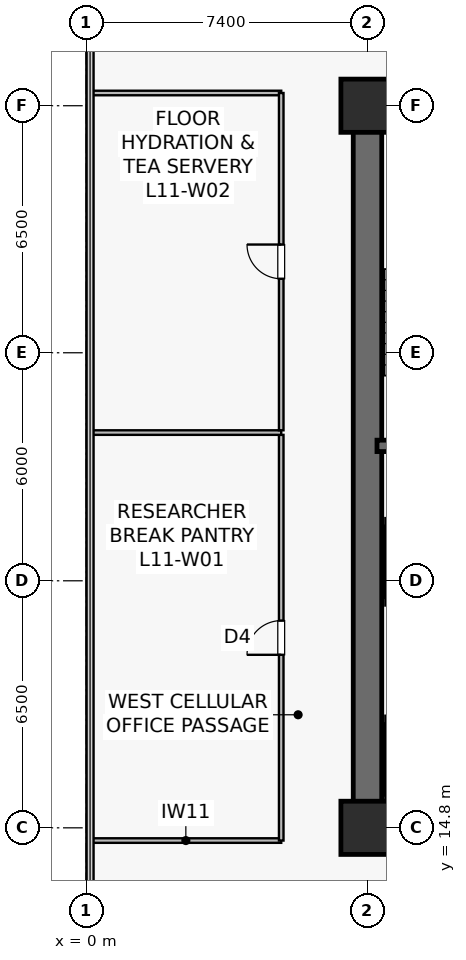
"""IFC4 building model, lengths in metres.
Left out: names, types, materials, properties, quantities, classifications, styles, units other than length and angle.
Written with IfcOpenShell. Run it as: python <this file> out.ifc"""

import sys

from ifc_helpers import new_model, si_unit, direction, frame, frame_2d, origin, origin_2d, place, context, subcontext, project, spatial, rectangle, extrude, source, transform, mapped, element, fill, save


model = new_model("IFC4")
c1 = context("Model", 3, precision=1e-05, world=origin(), true_north=direction((0.0, 1.0)))
c2 = subcontext(c1, "Body", "Model", "MODEL_VIEW")
j1 = project(units=[si_unit("LENGTHUNIT", "METRE"), si_unit("PLANEANGLEUNIT", "RADIAN")], contexts=[c1])
p1 = place(None, origin())
s1 = spatial("IfcSite", under=j1, at=p1, CompositionType="ELEMENT")
p2 = place(p1, origin())
s2 = spatial("IfcBuilding", under=s1, at=p2, CompositionType="ELEMENT")
p3 = place(p2, frame((0.0, 0.0, 45.7)))
s3 = spatial("IfcBuildingStorey", under=s2, at=p3, CompositionType="ELEMENT", Elevation=45.7)
p4 = place(p3, frame((7.025, 14.8, 0.0), z_axis=(0.0, 0.0, 1.0), x_axis=(1.0, 0.0, 0.0)))
e1 = element("IfcWall", 1, at=p4, inside=s3, PredefinedType="SHEAR", context=c2, shape_type="SweptSolid", body=[
    extrude(rectangle(XDim=15.55, YDim=0.75, at=frame_2d((7.775, 0.0))), origin(), (0.0, 0.0, 1.0), 3.78),
])
p5 = place(p3, frame((7.025, 33.8, 0.0), z_axis=(0.0, 0.0, 1.0), x_axis=(1.0, 0.0, 0.0)))
e2 = element("IfcWall", 2, at=p5, inside=s3, PredefinedType="SHEAR", context=c2, shape_type="SweptSolid", body=[
    extrude(rectangle(XDim=15.55, YDim=0.75, at=frame_2d((7.775, 0.0))), origin(), (0.0, 0.0, 1.0), 3.78),
])
p6 = place(p5, frame((5.725, 0.0, 0.0)))
e3 = element("IfcOpeningElement", 3, at=p6, cuts=e2, PredefinedType="OPENING", context=c2, shape_type="SweptSolid", body=[
    extrude(rectangle(XDim=0.95, YDim=2.15, at=frame_2d((0.475, 1.075))), frame((0.0, 0.385, 0.0), z_axis=(0.0, -1.0, 0.0), x_axis=(1.0, 0.0, 0.0)), (0.0, 0.0, 1.0), 0.77),
])
p7 = place(p5, frame((9.09, 0.0, 0.0)))
e4 = element("IfcOpeningElement", 4, at=p7, cuts=e2, PredefinedType="OPENING", context=c2, shape_type="SweptSolid", body=[
    extrude(rectangle(XDim=0.95, YDim=2.15, at=frame_2d((0.475, 1.075))), frame((0.0, 0.385, 0.0), z_axis=(0.0, -1.0, 0.0), x_axis=(1.0, 0.0, 0.0)), (0.0, 0.0, 1.0), 0.77),
])
p8 = place(p5, frame((12.49, 0.0, 0.0)))
e5 = element("IfcOpeningElement", 5, at=p8, cuts=e2, PredefinedType="OPENING", context=c2, shape_type="SweptSolid", body=[
    extrude(rectangle(XDim=0.95, YDim=2.15, at=frame_2d((0.475, 1.075))), frame((0.0, 0.385, 0.0), z_axis=(0.0, -1.0, 0.0), x_axis=(1.0, 0.0, 0.0)), (0.0, 0.0, 1.0), 0.77),
])
p9 = place(p3, frame((7.4, 15.175, 0.0), z_axis=(0.0, 0.0, 1.0), x_axis=(0.0, 1.0, 0.0)))
e6 = element("IfcWall", 6, at=p9, inside=s3, PredefinedType="SHEAR", context=c2, shape_type="SweptSolid", body=[
    extrude(rectangle(XDim=18.25, YDim=0.75, at=frame_2d((9.125, 0.0))), origin(), (0.0, 0.0, 1.0), 3.78),
])
p10 = place(p3, frame((7.65, 24.85, 0.0), z_axis=(0.0, 0.0, 1.0), x_axis=(1.0, 0.0, 0.0)))
e7 = element("IfcWall", 7, at=p10, inside=s3, PredefinedType="SHEAR", context=c2, shape_type="SweptSolid", body=[
    extrude(rectangle(XDim=3.8, YDim=0.3, at=frame_2d((1.9, 0.0))), origin(), (0.0, 0.0, 1.0), 3.78),
])
p11 = place(p3, frame((7.73, 33.4, 0.0), z_axis=(0.0, 0.0, 1.0), x_axis=(1.0, 0.0, 0.0)))
e8 = element("IfcWall", 8, at=p11, inside=s3, PredefinedType="SOLIDWALL", context=c2, shape_type="SweptSolid", body=[
    extrude(rectangle(XDim=3.72, YDim=0.12, at=frame_2d((1.86, 0.0))), origin(), (0.0, 0.0, 1.0), 3.78),
])
m1 = source(origin(), c2, "Body", "SweptSolid", [
    extrude(rectangle(XDim=1.4, YDim=1.4, at=origin_2d()), origin(), (0.0, 0.0, 1.0), 4.1),
])
for number, where, z_axis, x_axis in (
    (9, (7.4, 14.8, 0.0), (0.0, 0.0, 1.0), (1.0, 0.0, 0.0)),
    (10, (7.4, 33.8, 0.0), (0.0, 0.0, 1.0), (1.0, 0.0, 0.0)),
):
    element("IfcColumn", number, at=place(p3, frame(where, z_axis=z_axis, x_axis=x_axis)), inside=s3, PredefinedType="COLUMN", context=c2, shape_type="MappedRepresentation", body=[
        mapped(m1, transform((0.0, 0.0, 0.0), scale=1.0)),
    ])
p12 = place(p3, frame((7.87, 17.65, 0.0), z_axis=(0.0, 0.0, 1.0), x_axis=(1.0, 0.0, 0.0)))
e11 = element("IfcWall", 11, at=p12, inside=s3, PredefinedType="SOLIDWALL", context=c2, shape_type="SweptSolid", body=[
    extrude(rectangle(XDim=2.26, YDim=0.2, at=frame_2d((1.13, 0.0))), origin(), (0.0, 0.0, 1.0), 3.78),
])
p13 = place(p12, frame((0.58, 0.0, 0.0)))
e12 = element("IfcOpeningElement", 12, at=p13, cuts=e11, PredefinedType="OPENING", context=c2, shape_type="SweptSolid", body=[
    extrude(rectangle(XDim=1.1, YDim=2.22, at=frame_2d((0.55, 1.11))), frame((0.0, 0.11, 0.0), z_axis=(0.0, -1.0, 0.0), x_axis=(1.0, 0.0, 0.0)), (0.0, 0.0, 1.0), 0.22),
])
p14 = place(p3, frame((7.87, 15.55, 0.0), z_axis=(0.0, 0.0, 1.0), x_axis=(1.0, 0.0, 0.0)))
e13 = element("IfcWall", 13, at=p14, inside=s3, PredefinedType="SOLIDWALL", context=c2, shape_type="SweptSolid", body=[
    extrude(rectangle(XDim=2.26, YDim=0.2, at=frame_2d((1.13, 0.0))), origin(), (0.0, 0.0, 1.0), 3.78),
])
p15 = place(p3, frame((7.95, 15.65, 0.0), z_axis=(0.0, 0.0, 1.0), x_axis=(0.0, 1.0, 0.0)))
e14 = element("IfcWall", 14, at=p15, inside=s3, PredefinedType="SOLIDWALL", context=c2, shape_type="SweptSolid", body=[
    extrude(rectangle(XDim=1.9, YDim=0.18, at=frame_2d((0.95, 0.0))), origin(), (0.0, 0.0, 1.0), 3.78),
])
for number, where, z_axis, x_axis in (
    (15, (7.87, 20.75, 0.0), (0.0, 0.0, 1.0), (1.0, 0.0, 0.0)),
    (16, (7.87, 22.85, 0.0), (0.0, 0.0, 1.0), (1.0, 0.0, 0.0)),
):
    element("IfcWall", number, at=place(p3, frame(where, z_axis=z_axis, x_axis=x_axis)), inside=s3, PredefinedType="SOLIDWALL", context=c2, shape_type="SweptSolid", body=[
        extrude(rectangle(XDim=2.26, YDim=0.2, at=frame_2d((1.13, 0.0))), origin(), (0.0, 0.0, 1.0), 3.78),
    ])
p16 = place(p3, frame((7.95, 20.85, 0.0), z_axis=(0.0, 0.0, 1.0), x_axis=(0.0, 1.0, 0.0)))
e17 = element("IfcWall", 17, at=p16, inside=s3, PredefinedType="SOLIDWALL", context=c2, shape_type="SweptSolid", body=[
    extrude(rectangle(XDim=1.9, YDim=0.18, at=frame_2d((0.95, 0.0))), origin(), (0.0, 0.0, 1.0), 3.78),
])
for number, where, z_axis, x_axis in (
    (18, (0.11, 14.465, 0.0), (0.0, 0.0, 1.0), (1.0, 0.0, 0.0)),
    (19, (0.11, 34.135, 0.0), (0.0, 0.0, 1.0), (1.0, 0.0, 0.0)),
):
    element("IfcWall", number, at=place(p3, frame(where, z_axis=z_axis, x_axis=x_axis)), inside=s3, PredefinedType="PARTITIONING", context=c2, shape_type="SweptSolid", body=[
        extrude(rectangle(XDim=5.02, YDim=0.12, at=frame_2d((2.51, 0.0))), origin(), (0.0, 0.0, 1.0), 3.78),
    ])
p17 = place(p3, frame((5.13, 14.465, 0.0), z_axis=(0.0, 0.0, 1.0), x_axis=(0.0, 1.0, 0.0)))
e20 = element("IfcWall", 20, at=p17, inside=s3, PredefinedType="PARTITIONING", context=c2, shape_type="SweptSolid", body=[
    extrude(rectangle(XDim=10.675, YDim=0.12, at=frame_2d((5.337, 0.0))), origin(), (0.0, 0.0, 1.0), 3.78),
])
p18 = place(p17, frame((4.887, 0.0, 0.0)))
e21 = element("IfcOpeningElement", 21, at=p18, cuts=e20, PredefinedType="OPENING", context=c2, shape_type="SweptSolid", body=[
    extrude(rectangle(XDim=0.9, YDim=2.1, at=frame_2d((0.45, 1.05))), frame((0.0, 0.07, 0.0), z_axis=(0.0, -1.0, 0.0), x_axis=(1.0, 0.0, 0.0)), (0.0, 0.0, 1.0), 0.14),
])
p19 = place(p3, frame((0.11, 25.2, 0.0), z_axis=(0.0, 0.0, 1.0), x_axis=(1.0, 0.0, 0.0)))
e22 = element("IfcWall", 22, at=p19, inside=s3, PredefinedType="PARTITIONING", context=c2, shape_type="SweptSolid", body=[
    extrude(rectangle(XDim=5.02, YDim=0.12, at=frame_2d((2.51, 0.0))), origin(), (0.0, 0.0, 1.0), 3.78),
])
p20 = place(p3, frame((5.13, 25.26, 0.0), z_axis=(0.0, 0.0, 1.0), x_axis=(0.0, 1.0, 0.0)))
e23 = element("IfcWall", 23, at=p20, inside=s3, PredefinedType="PARTITIONING", context=c2, shape_type="SweptSolid", body=[
    extrude(rectangle(XDim=8.875, YDim=0.12, at=frame_2d((4.438, 0.0))), origin(), (0.0, 0.0, 1.0), 3.78),
])
p21 = place(p20, frame((3.988, 0.0, 0.0)))
e24 = element("IfcOpeningElement", 24, at=p21, cuts=e23, PredefinedType="OPENING", context=c2, shape_type="SweptSolid", body=[
    extrude(rectangle(XDim=0.9, YDim=2.1, at=frame_2d((0.45, 1.05))), frame((0.0, 0.07, 0.0), z_axis=(0.0, -1.0, 0.0), x_axis=(1.0, 0.0, 0.0)), (0.0, 0.0, 1.0), 0.14),
])
m2 = source(origin(), c2, "Body", "SweptSolid", [
    extrude(rectangle(XDim=0.9, YDim=2.1, at=frame_2d((0.45, 1.05))), frame((0.0, 0.025, 0.0), z_axis=(0.0, -1.0, 0.0), x_axis=(1.0, 0.0, 0.0)), (0.0, 0.0, 1.0), 0.05),
])
p22 = place(p18, origin())
e25 = element("IfcDoor", 25, at=p22, inside=s3, OperationType="SINGLE_SWING_LEFT", PredefinedType="DOOR", context=c2, shape_type="MappedRepresentation", body=[
    mapped(m2, transform((0.0, 0.0, 0.0), scale=1.0)),
])
fill(e21, e25)
p23 = place(p21, origin())
e26 = element("IfcDoor", 26, at=p23, inside=s3, OperationType="SINGLE_SWING_RIGHT", PredefinedType="DOOR", context=c2, shape_type="MappedRepresentation", body=[
    mapped(m2, transform((0.0, 0.0, 0.0), scale=1.0)),
])
fill(e24, e26)
save(model, sys.argv[1])
